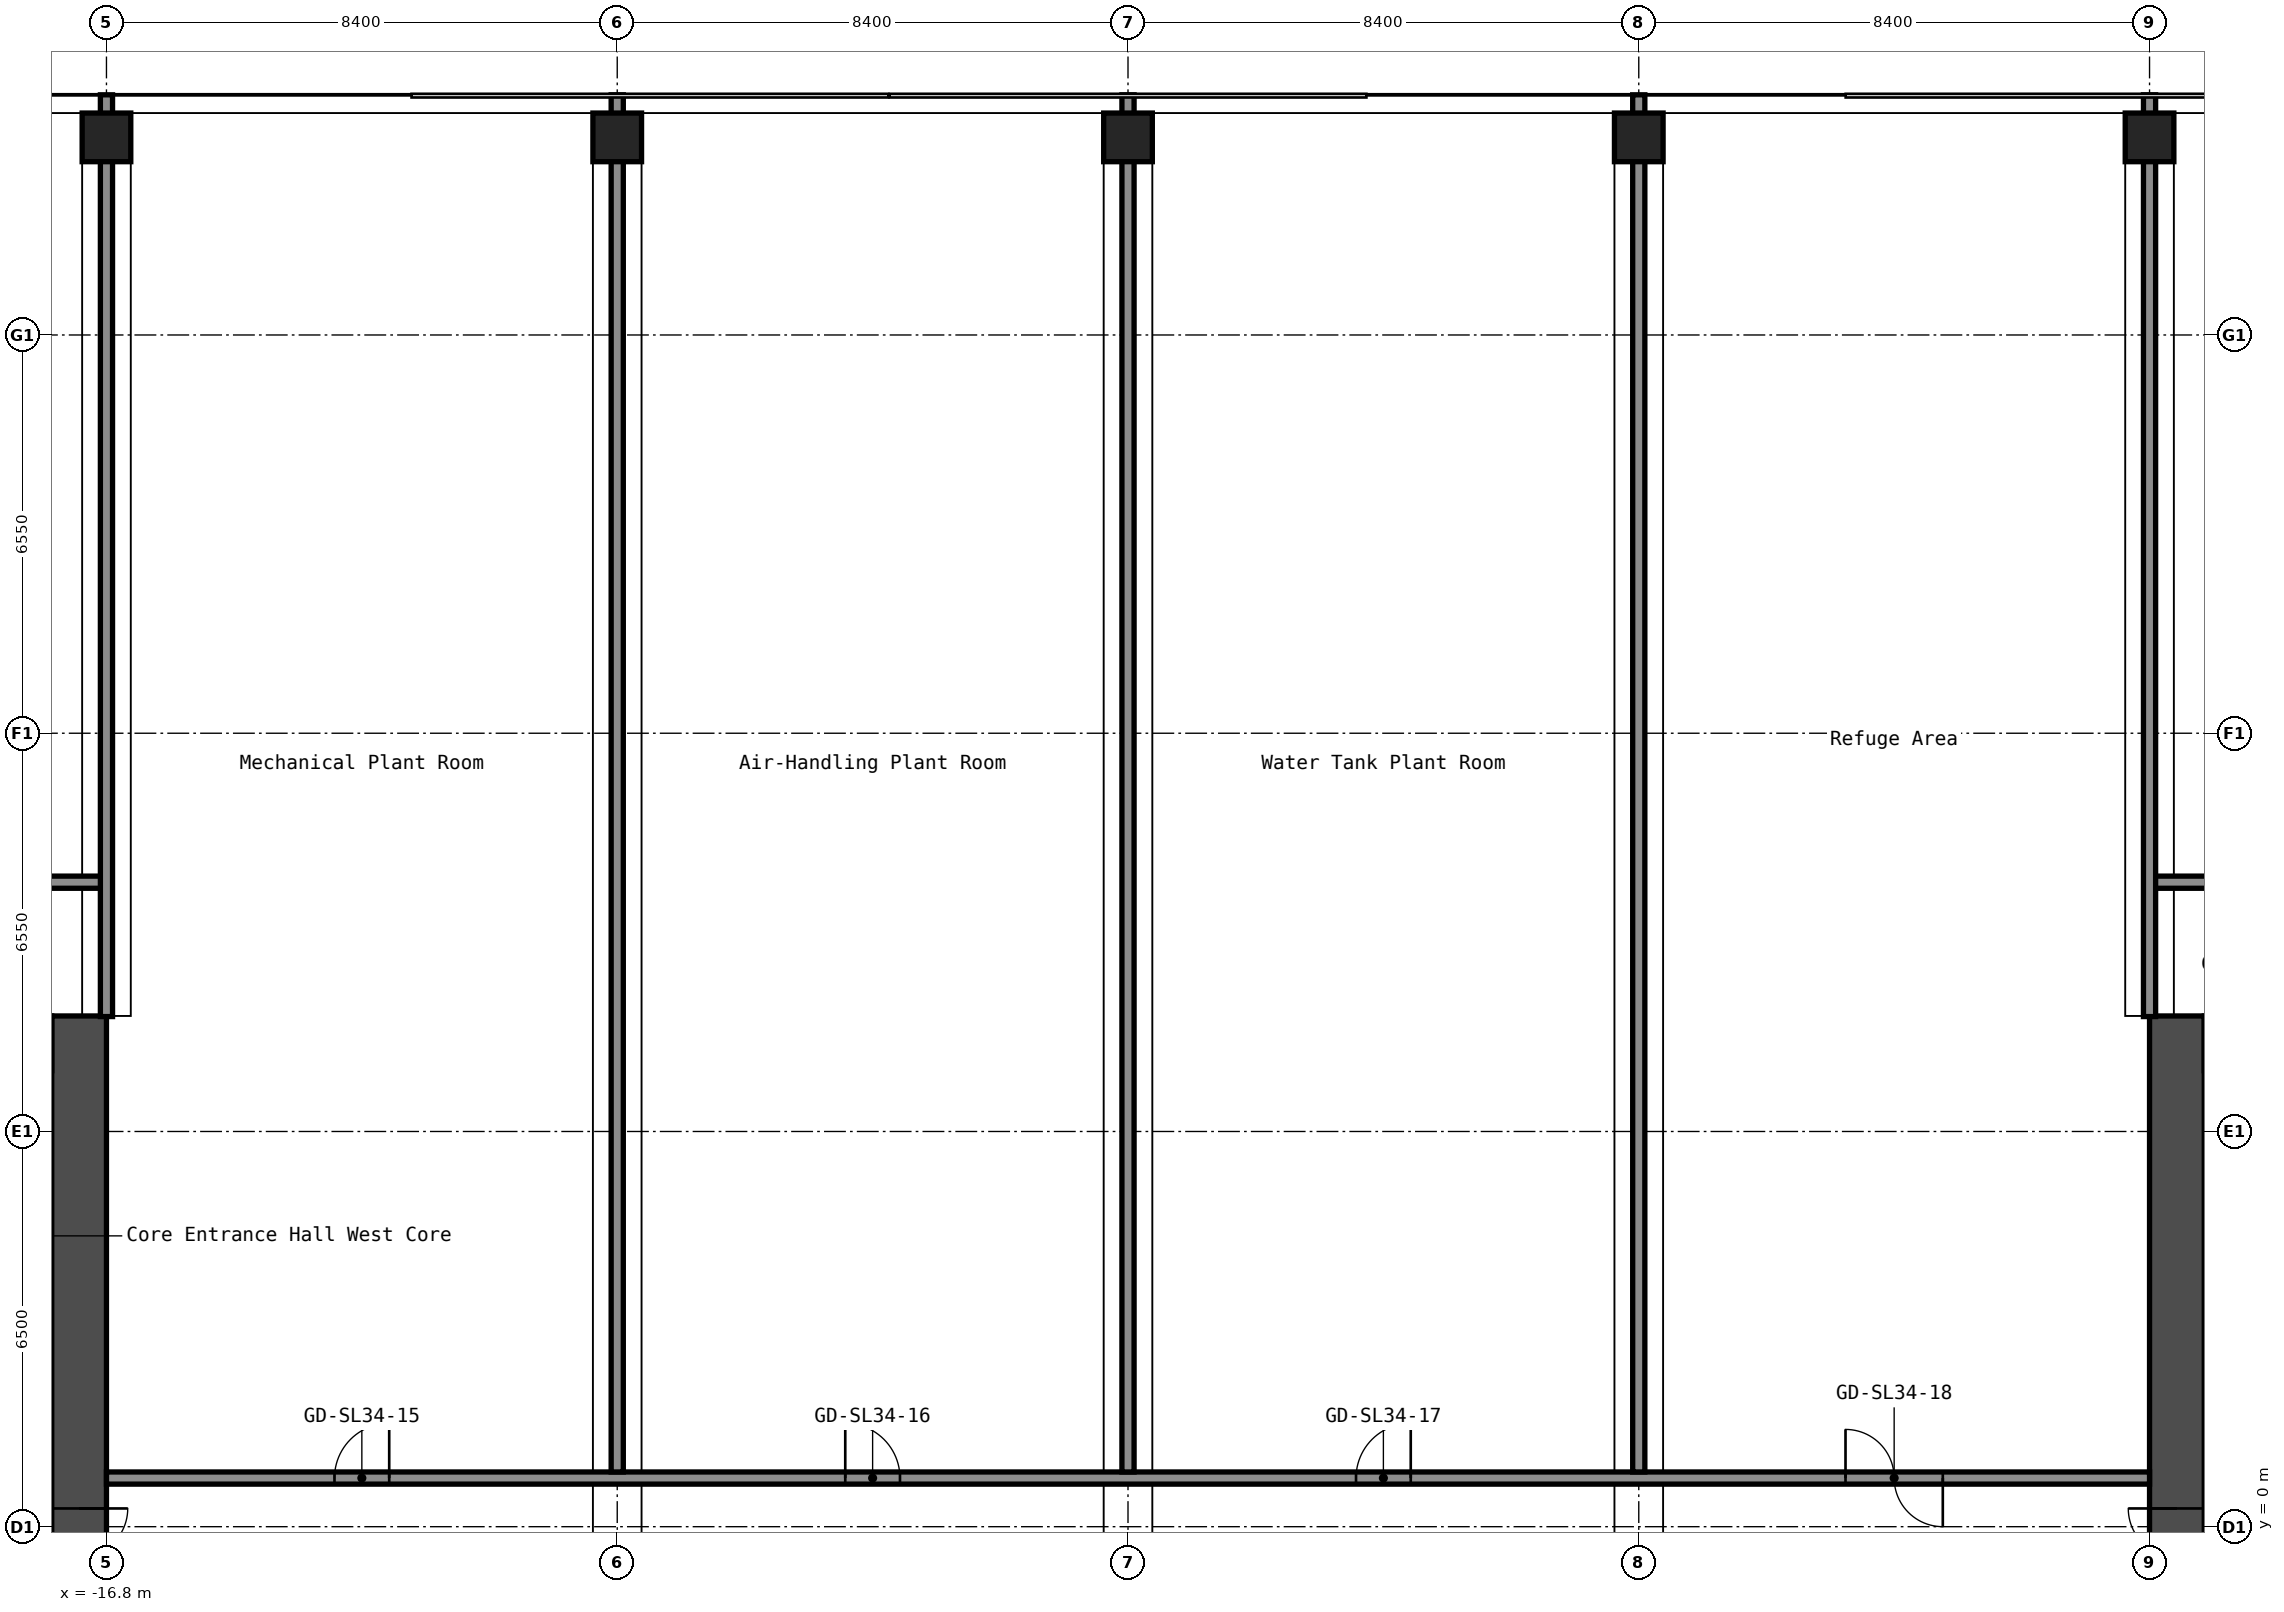
"""IFC4 building model, lengths in metres.
Left out: names, types, materials, properties, quantities, classifications, styles, units other than length and angle.
Written with IfcOpenShell. Run it as: python <this file> out.ifc"""

import sys

from ifc_helpers import new_model, si_unit, direction, frame, frame_2d, origin, origin_2d, place, context, subcontext, project, spatial, rectangle, hollow_rectangle, extrude, element, fill, save


model = new_model("IFC4")
c1 = context("Model", 3, precision=1e-05, world=origin(), true_north=direction((0.0, 1.0)))
c2 = subcontext(c1, "Body", "Model", "MODEL_VIEW")
j1 = project(units=[si_unit("LENGTHUNIT", "METRE"), si_unit("PLANEANGLEUNIT", "RADIAN")], contexts=[c1])
p1 = place(None, origin())
s1 = spatial("IfcSite", under=j1, at=p1, CompositionType="ELEMENT")
p2 = place(p1, origin())
s2 = spatial("IfcBuilding", under=s1, at=p2, CompositionType="ELEMENT")
p3 = place(p2, frame((0.0, 0.0, 120.2)))
s3 = spatial("IfcBuildingStorey", under=s2, at=p3, CompositionType="ELEMENT", Elevation=120.2)
for number, where, z_axis, x_axis in (
    (1, (-16.8, 22.85, 0.0), (0.0, 0.0, 1.0), (1.0, 0.0, 0.0)),
    (2, (-8.4, 22.85, 0.0), (0.0, 0.0, 1.0), (1.0, 0.0, 0.0)),
    (3, (0.0, 22.85, 0.0), (0.0, 0.0, 1.0), (1.0, 0.0, 0.0)),
    (4, (8.4, 22.85, 0.0), (0.0, 0.0, 1.0), (1.0, 0.0, 0.0)),
    (5, (16.8, 22.85, 0.0), (0.0, 0.0, 1.0), (1.0, 0.0, 0.0)),
):
    element("IfcColumn", number, at=place(p3, frame(where, z_axis=z_axis, x_axis=x_axis)), inside=s3, PredefinedType="COLUMN", context=c2, shape_type="SweptSolid", body=[
        extrude(hollow_rectangle(XDim=0.8, YDim=0.8, WallThickness=0.032, at=origin_2d()), origin(), (0.0, 0.0, 1.0), 4.1),
    ])
p4 = place(p3, frame((-17.25, -8.4, 0.0), z_axis=(0.0, 0.0, 1.0), x_axis=(0.0, 1.0, 0.0)))
e6 = element("IfcWall", 6, at=p4, inside=s3, PredefinedType="SHEAR", context=c2, shape_type="SweptSolid", body=[
    extrude(rectangle(XDim=16.8, YDim=0.9, at=frame_2d((8.4, 0.0))), origin(), (0.0, 0.0, 1.0), 4.1),
])
p5 = place(p4, frame((7.1, 0.0, 0.0)))
e7 = element("IfcOpeningElement", 7, at=p5, cuts=e6, PredefinedType="OPENING", context=c2, shape_type="SweptSolid", body=[
    extrude(rectangle(XDim=1.6, YDim=2.1, at=frame_2d((0.8, 1.05))), frame((0.0, 0.46, 0.0), z_axis=(0.0, -1.0, 0.0), x_axis=(1.0, 0.0, 0.0)), (0.0, 0.0, 1.0), 0.92),
])
p6 = place(p3, frame((-32.7, 7.95, 0.0), z_axis=(0.0, 0.0, 1.0), x_axis=(1.0, 0.0, 0.0)))
e8 = element("IfcWall", 8, at=p6, inside=s3, PredefinedType="SHEAR", context=c2, shape_type="SweptSolid", body=[
    extrude(rectangle(XDim=15.0, YDim=0.9, at=frame_2d((7.5, 0.0))), origin(), (0.0, 0.0, 1.0), 4.1),
])
p7 = place(p6, frame((3.4, 0.0, 0.0)))
e9 = element("IfcOpeningElement", 9, at=p7, cuts=e8, PredefinedType="OPENING", context=c2, shape_type="SweptSolid", body=[
    extrude(rectangle(XDim=1.2, YDim=2.1, at=frame_2d((0.6, 1.05))), frame((0.0, 0.46, 0.0), z_axis=(0.0, -1.0, 0.0), x_axis=(1.0, 0.0, 0.0)), (0.0, 0.0, 1.0), 0.92),
])
p8 = place(p6, frame((0.75, 0.0, 0.0)))
e10 = element("IfcOpeningElement", 10, at=p8, cuts=e8, PredefinedType="OPENING", context=c2, shape_type="SweptSolid", body=[
    extrude(rectangle(XDim=0.9, YDim=2.1, at=frame_2d((0.45, 1.05))), frame((0.0, 0.46, 0.0), z_axis=(0.0, -1.0, 0.0), x_axis=(1.0, 0.0, 0.0)), (0.0, 0.0, 1.0), 0.92),
])
p9 = place(p3, frame((17.25, -8.4, 0.0), z_axis=(0.0, 0.0, 1.0), x_axis=(0.0, 1.0, 0.0)))
e11 = element("IfcWall", 11, at=p9, inside=s3, PredefinedType="SHEAR", context=c2, shape_type="SweptSolid", body=[
    extrude(rectangle(XDim=16.8, YDim=0.9, at=frame_2d((8.4, 0.0))), origin(), (0.0, 0.0, 1.0), 4.1),
])
p10 = place(p9, frame((7.1, 0.0, 0.0)))
e12 = element("IfcOpeningElement", 12, at=p10, cuts=e11, PredefinedType="OPENING", context=c2, shape_type="SweptSolid", body=[
    extrude(rectangle(XDim=1.6, YDim=2.1, at=frame_2d((0.8, 1.05))), frame((0.0, 0.46, 0.0), z_axis=(0.0, -1.0, 0.0), x_axis=(1.0, 0.0, 0.0)), (0.0, 0.0, 1.0), 0.92),
])
p11 = place(p3, frame((17.7, 7.95, 0.0), z_axis=(0.0, 0.0, 1.0), x_axis=(1.0, 0.0, 0.0)))
e13 = element("IfcWall", 13, at=p11, inside=s3, PredefinedType="SHEAR", context=c2, shape_type="SweptSolid", body=[
    extrude(rectangle(XDim=15.0, YDim=0.9, at=frame_2d((7.5, 0.0))), origin(), (0.0, 0.0, 1.0), 4.1),
])
p12 = place(p11, frame((10.4, 0.0, 0.0)))
e14 = element("IfcOpeningElement", 14, at=p12, cuts=e13, PredefinedType="OPENING", context=c2, shape_type="SweptSolid", body=[
    extrude(rectangle(XDim=1.2, YDim=2.1, at=frame_2d((0.6, 1.05))), frame((0.0, 0.46, 0.0), z_axis=(0.0, -1.0, 0.0), x_axis=(1.0, 0.0, 0.0)), (0.0, 0.0, 1.0), 0.92),
])
p13 = place(p11, frame((13.35, 0.0, 0.0)))
e15 = element("IfcOpeningElement", 15, at=p13, cuts=e13, PredefinedType="OPENING", context=c2, shape_type="SweptSolid", body=[
    extrude(rectangle(XDim=0.9, YDim=2.1, at=frame_2d((0.45, 1.05))), frame((0.0, 0.46, 0.0), z_axis=(0.0, -1.0, 0.0), x_axis=(1.0, 0.0, 0.0)), (0.0, 0.0, 1.0), 0.92),
])
p14 = place(p3, frame((-16.8, 0.8, 0.0), z_axis=(0.0, 0.0, 1.0), x_axis=(1.0, 0.0, 0.0)))
e16 = element("IfcWall", 16, at=p14, inside=s3, PredefinedType="PARTITIONING", context=c2, shape_type="SweptSolid", body=[
    extrude(rectangle(XDim=33.6, YDim=0.2, at=frame_2d((16.8, 0.0))), origin(), (0.0, 0.0, 1.0), 4.1),
])
p15 = place(p14, frame((3.75, 0.0, 0.0)))
e17 = element("IfcOpeningElement", 17, at=p15, cuts=e16, PredefinedType="OPENING", context=c2, shape_type="SweptSolid", body=[
    extrude(rectangle(XDim=0.9, YDim=2.1, at=frame_2d((0.45, 1.05))), frame((0.0, 0.11, 0.0), z_axis=(0.0, -1.0, 0.0), x_axis=(1.0, 0.0, 0.0)), (0.0, 0.0, 1.0), 0.22),
])
p16 = place(p14, frame((12.15, 0.0, 0.0)))
e18 = element("IfcOpeningElement", 18, at=p16, cuts=e16, PredefinedType="OPENING", context=c2, shape_type="SweptSolid", body=[
    extrude(rectangle(XDim=0.9, YDim=2.1, at=frame_2d((0.45, 1.05))), frame((0.0, 0.11, 0.0), z_axis=(0.0, -1.0, 0.0), x_axis=(1.0, 0.0, 0.0)), (0.0, 0.0, 1.0), 0.22),
])
p17 = place(p14, frame((20.55, 0.0, 0.0)))
e19 = element("IfcOpeningElement", 19, at=p17, cuts=e16, PredefinedType="OPENING", context=c2, shape_type="SweptSolid", body=[
    extrude(rectangle(XDim=0.9, YDim=2.1, at=frame_2d((0.45, 1.05))), frame((0.0, 0.11, 0.0), z_axis=(0.0, -1.0, 0.0), x_axis=(1.0, 0.0, 0.0)), (0.0, 0.0, 1.0), 0.22),
])
p18 = place(p14, frame((28.6, 0.0, 0.0)))
e20 = element("IfcOpeningElement", 20, at=p18, cuts=e16, PredefinedType="OPENING", context=c2, shape_type="SweptSolid", body=[
    extrude(rectangle(XDim=1.6, YDim=2.1, at=frame_2d((0.8, 1.05))), frame((0.0, 0.11, 0.0), z_axis=(0.0, -1.0, 0.0), x_axis=(1.0, 0.0, 0.0)), (0.0, 0.0, 1.0), 0.22),
])
p19 = place(p3, frame((-46.5, 10.6, 0.0), z_axis=(0.0, 0.0, 1.0), x_axis=(1.0, 0.0, 0.0)))
e21 = element("IfcWall", 21, at=p19, inside=s3, PredefinedType="PARTITIONING", context=c2, shape_type="SweptSolid", body=[
    extrude(rectangle(XDim=29.7, YDim=0.2, at=frame_2d((14.85, 0.0))), origin(), (0.0, 0.0, 1.0), 4.1),
])
p20 = place(p19, frame((1.9, 0.0, 0.0)))
e22 = element("IfcOpeningElement", 22, at=p20, cuts=e21, PredefinedType="OPENING", context=c2, shape_type="SweptSolid", body=[
    extrude(rectangle(XDim=1.0, YDim=2.1, at=frame_2d((0.5, 1.05))), frame((0.0, 0.11, 0.0), z_axis=(0.0, -1.0, 0.0), x_axis=(1.0, 0.0, 0.0)), (0.0, 0.0, 1.0), 0.22),
])
p21 = place(p19, frame((7.9, 0.0, 0.0)))
e23 = element("IfcOpeningElement", 23, at=p21, cuts=e21, PredefinedType="OPENING", context=c2, shape_type="SweptSolid", body=[
    extrude(rectangle(XDim=1.6, YDim=2.1, at=frame_2d((0.8, 1.05))), frame((0.0, 0.11, 0.0), z_axis=(0.0, -1.0, 0.0), x_axis=(1.0, 0.0, 0.0)), (0.0, 0.0, 1.0), 0.22),
])
p22 = place(p19, frame((16.65, 0.0, 0.0)))
e24 = element("IfcOpeningElement", 24, at=p22, cuts=e21, PredefinedType="OPENING", context=c2, shape_type="SweptSolid", body=[
    extrude(rectangle(XDim=0.9, YDim=2.1, at=frame_2d((0.45, 1.05))), frame((0.0, 0.11, 0.0), z_axis=(0.0, -1.0, 0.0), x_axis=(1.0, 0.0, 0.0)), (0.0, 0.0, 1.0), 0.22),
])
p23 = place(p19, frame((25.05, 0.0, 0.0)))
e25 = element("IfcOpeningElement", 25, at=p23, cuts=e21, PredefinedType="OPENING", context=c2, shape_type="SweptSolid", body=[
    extrude(rectangle(XDim=0.9, YDim=2.1, at=frame_2d((0.45, 1.05))), frame((0.0, 0.11, 0.0), z_axis=(0.0, -1.0, 0.0), x_axis=(1.0, 0.0, 0.0)), (0.0, 0.0, 1.0), 0.22),
])
p24 = place(p3, frame((16.8, 10.6, 0.0), z_axis=(0.0, 0.0, 1.0), x_axis=(1.0, 0.0, 0.0)))
e26 = element("IfcWall", 26, at=p24, inside=s3, PredefinedType="PARTITIONING", context=c2, shape_type="SweptSolid", body=[
    extrude(rectangle(XDim=29.7, YDim=0.2, at=frame_2d((14.85, 0.0))), origin(), (0.0, 0.0, 1.0), 4.1),
])
p25 = place(p24, frame((3.75, 0.0, 0.0)))
e27 = element("IfcOpeningElement", 27, at=p25, cuts=e26, PredefinedType="OPENING", context=c2, shape_type="SweptSolid", body=[
    extrude(rectangle(XDim=0.9, YDim=2.1, at=frame_2d((0.45, 1.05))), frame((0.0, 0.11, 0.0), z_axis=(0.0, -1.0, 0.0), x_axis=(1.0, 0.0, 0.0)), (0.0, 0.0, 1.0), 0.22),
])
p26 = place(p24, frame((11.8, 0.0, 0.0)))
e28 = element("IfcOpeningElement", 28, at=p26, cuts=e26, PredefinedType="OPENING", context=c2, shape_type="SweptSolid", body=[
    extrude(rectangle(XDim=1.6, YDim=2.1, at=frame_2d((0.8, 1.05))), frame((0.0, 0.11, 0.0), z_axis=(0.0, -1.0, 0.0), x_axis=(1.0, 0.0, 0.0)), (0.0, 0.0, 1.0), 0.22),
])
p27 = place(p24, frame((20.2, 0.0, 0.0)))
e29 = element("IfcOpeningElement", 29, at=p27, cuts=e26, PredefinedType="OPENING", context=c2, shape_type="SweptSolid", body=[
    extrude(rectangle(XDim=1.6, YDim=2.1, at=frame_2d((0.8, 1.05))), frame((0.0, 0.11, 0.0), z_axis=(0.0, -1.0, 0.0), x_axis=(1.0, 0.0, 0.0)), (0.0, 0.0, 1.0), 0.22),
])
p28 = place(p24, frame((26.85, 0.0, 0.0)))
e30 = element("IfcOpeningElement", 30, at=p28, cuts=e26, PredefinedType="OPENING", context=c2, shape_type="SweptSolid", body=[
    extrude(rectangle(XDim=0.9, YDim=2.1, at=frame_2d((0.45, 1.05))), frame((0.0, 0.11, 0.0), z_axis=(0.0, -1.0, 0.0), x_axis=(1.0, 0.0, 0.0)), (0.0, 0.0, 1.0), 0.22),
])
p29 = place(p3, frame((-16.8, 8.39, 0.0), z_axis=(0.0, 0.0, 1.0), x_axis=(0.0, 1.0, 0.0)))
e31 = element("IfcWall", 31, at=p29, inside=s3, PredefinedType="PARTITIONING", context=c2, shape_type="SweptSolid", body=[
    extrude(rectangle(XDim=15.16, YDim=0.2, at=frame_2d((7.58, 0.0))), origin(), (0.0, 0.0, 1.0), 4.1),
])
for number, where, z_axis, x_axis in (
    (32, (-8.4, 0.9, 0.0), (0.0, 0.0, 1.0), (0.0, 1.0, 0.0)),
    (33, (0.0, 0.9, 0.0), (0.0, 0.0, 1.0), (0.0, 1.0, 0.0)),
    (34, (8.4, 0.9, 0.0), (0.0, 0.0, 1.0), (0.0, 1.0, 0.0)),
):
    element("IfcWall", number, at=place(p3, frame(where, z_axis=z_axis, x_axis=x_axis)), inside=s3, PredefinedType="PARTITIONING", context=c2, shape_type="SweptSolid", body=[
        extrude(rectangle(XDim=22.65, YDim=0.2, at=frame_2d((11.325, 0.0))), origin(), (0.0, 0.0, 1.0), 4.1),
    ])
p30 = place(p3, frame((16.8, 8.39, 0.0), z_axis=(0.0, 0.0, 1.0), x_axis=(0.0, 1.0, 0.0)))
e35 = element("IfcWall", 35, at=p30, inside=s3, PredefinedType="PARTITIONING", context=c2, shape_type="SweptSolid", body=[
    extrude(rectangle(XDim=15.16, YDim=0.2, at=frame_2d((7.58, 0.0))), origin(), (0.0, 0.0, 1.0), 4.1),
])
p31 = place(p5, origin())
e36 = element("IfcDoor", 36, at=p31, inside=s3, OperationType="DOUBLE_DOOR_SINGLE_SWING", PredefinedType="DOOR", context=c2, shape_type="SweptSolid", body=[
    extrude(rectangle(XDim=1.6, YDim=2.1, at=frame_2d((0.8, 1.05))), frame((0.0, 0.025, 0.0), z_axis=(0.0, -1.0, 0.0), x_axis=(1.0, 0.0, 0.0)), (0.0, 0.0, 1.0), 0.05),
])
fill(e7, e36)
p32 = place(p10, origin())
e37 = element("IfcDoor", 37, at=p32, inside=s3, OperationType="DOUBLE_DOOR_SINGLE_SWING", PredefinedType="DOOR", context=c2, shape_type="SweptSolid", body=[
    extrude(rectangle(XDim=1.6, YDim=2.1, at=frame_2d((0.8, 1.05))), frame((0.0, 0.025, 0.0), z_axis=(0.0, -1.0, 0.0), x_axis=(1.0, 0.0, 0.0)), (0.0, 0.0, 1.0), 0.05),
])
fill(e12, e37)
p33 = place(p15, origin())
e38 = element("IfcDoor", 38, at=p33, inside=s3, OperationType="SINGLE_SWING_LEFT", PredefinedType="DOOR", context=c2, shape_type="SweptSolid", body=[
    extrude(rectangle(XDim=0.9, YDim=2.1, at=frame_2d((0.45, 1.05))), frame((0.0, 0.025, 0.0), z_axis=(0.0, -1.0, 0.0), x_axis=(1.0, 0.0, 0.0)), (0.0, 0.0, 1.0), 0.05),
])
fill(e17, e38)
p34 = place(p16, origin())
e39 = element("IfcDoor", 39, at=p34, inside=s3, OperationType="SINGLE_SWING_RIGHT", PredefinedType="DOOR", context=c2, shape_type="SweptSolid", body=[
    extrude(rectangle(XDim=0.9, YDim=2.1, at=frame_2d((0.45, 1.05))), frame((0.0, 0.025, 0.0), z_axis=(0.0, -1.0, 0.0), x_axis=(1.0, 0.0, 0.0)), (0.0, 0.0, 1.0), 0.05),
])
fill(e18, e39)
p35 = place(p17, origin())
e40 = element("IfcDoor", 40, at=p35, inside=s3, OperationType="SINGLE_SWING_LEFT", PredefinedType="DOOR", context=c2, shape_type="SweptSolid", body=[
    extrude(rectangle(XDim=0.9, YDim=2.1, at=frame_2d((0.45, 1.05))), frame((0.0, 0.025, 0.0), z_axis=(0.0, -1.0, 0.0), x_axis=(1.0, 0.0, 0.0)), (0.0, 0.0, 1.0), 0.05),
])
fill(e19, e40)
p36 = place(p18, origin())
e41 = element("IfcDoor", 41, at=p36, inside=s3, OperationType="DOUBLE_DOOR_SINGLE_SWING", PredefinedType="DOOR", context=c2, shape_type="SweptSolid", body=[
    extrude(rectangle(XDim=1.6, YDim=2.1, at=frame_2d((0.8, 1.05))), frame((0.0, 0.025, 0.0), z_axis=(0.0, -1.0, 0.0), x_axis=(1.0, 0.0, 0.0)), (0.0, 0.0, 1.0), 0.05),
])
fill(e20, e41)
save(model, sys.argv[1])
